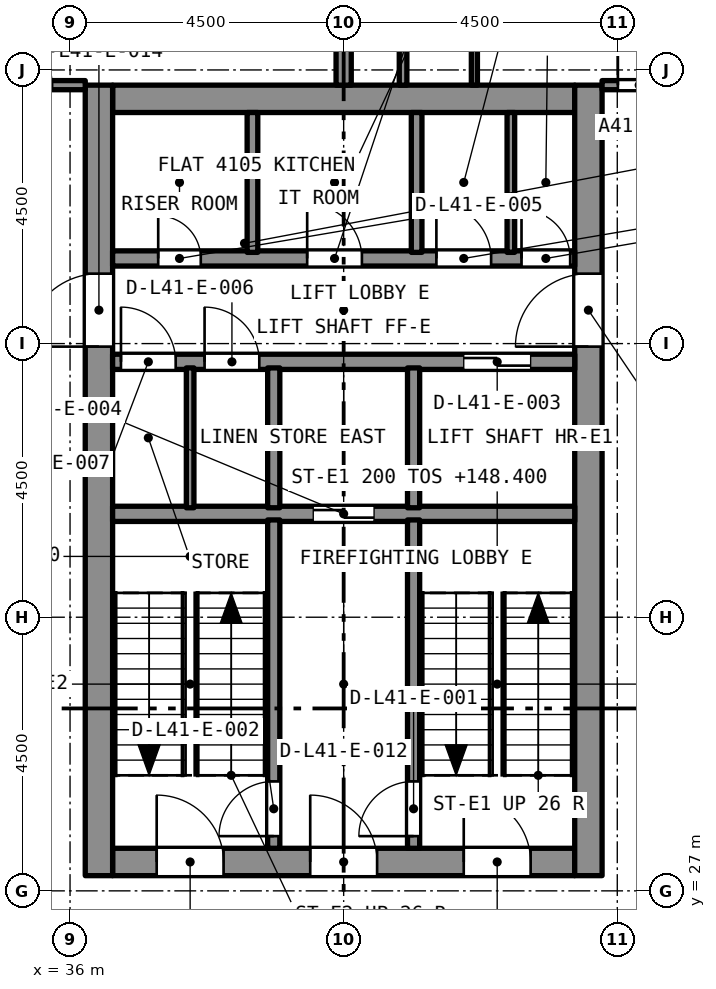
"""IFC4 building model, lengths in metres.
Left out: names, types, materials, properties, quantities, classifications, styles, units other than length and angle.
Written with IfcOpenShell. Run it as: python <this file> out.ifc"""

import sys

from ifc_helpers import new_model, si_unit, direction, frame, frame_2d, origin, place, context, subcontext, project, spatial, rectangle, extrude, element, fill, save


model = new_model("IFC4")
c1 = context("Model", 3, precision=1e-05, world=origin(), true_north=direction((0.0, 1.0)))
c2 = subcontext(c1, "Body", "Model", "MODEL_VIEW")
j1 = project(units=[si_unit("LENGTHUNIT", "METRE"), si_unit("PLANEANGLEUNIT", "RADIAN")], contexts=[c1])
p1 = place(None, origin())
s1 = spatial("IfcSite", under=j1, at=p1, CompositionType="ELEMENT")
p2 = place(p1, origin())
s2 = spatial("IfcBuilding", under=s1, at=p2, CompositionType="ELEMENT")
p3 = place(p2, frame((0.0, 0.0, 146.2)))
s3 = spatial("IfcBuildingStorey", under=s2, at=p3, CompositionType="ELEMENT", Elevation=146.2)
p4 = place(p3, frame((36.7, 27.475, 0.0), z_axis=(0.0, 0.0, 1.0), x_axis=(1.0, 0.0, 0.0)))
e1 = element("IfcWall", 1, at=p4, inside=s3, PredefinedType="SOLIDWALL", context=c2, shape_type="SweptSolid", body=[
    extrude(rectangle(XDim=7.6, YDim=0.45, at=frame_2d((3.8, 0.0))), origin(), (0.0, 0.0, 1.0), 4.4),
])
p5 = place(p4, frame((5.775, 0.0, 0.0)))
e2 = element("IfcOpeningElement", 2, at=p5, cuts=e1, PredefinedType="OPENING", context=c2, shape_type="SweptSolid", body=[
    extrude(rectangle(XDim=1.1, YDim=2.1, at=frame_2d((0.55, 1.05))), frame((0.0, 0.235, 0.0), z_axis=(0.0, -1.0, 0.0), x_axis=(1.0, 0.0, 0.0)), (0.0, 0.0, 1.0), 0.47),
])
p6 = place(p4, frame((3.25, 0.0, 0.0)))
e3 = element("IfcOpeningElement", 3, at=p6, cuts=e1, PredefinedType="OPENING", context=c2, shape_type="SweptSolid", body=[
    extrude(rectangle(XDim=1.1, YDim=2.1, at=frame_2d((0.55, 1.05))), frame((0.0, 0.235, 0.0), z_axis=(0.0, -1.0, 0.0), x_axis=(1.0, 0.0, 0.0)), (0.0, 0.0, 1.0), 0.47),
])
p7 = place(p4, frame((0.725, 0.0, 0.0)))
e4 = element("IfcOpeningElement", 4, at=p7, cuts=e1, PredefinedType="OPENING", context=c2, shape_type="SweptSolid", body=[
    extrude(rectangle(XDim=1.1, YDim=2.1, at=frame_2d((0.55, 1.05))), frame((0.0, 0.235, 0.0), z_axis=(0.0, -1.0, 0.0), x_axis=(1.0, 0.0, 0.0)), (0.0, 0.0, 1.0), 0.47),
])
p8 = place(p3, frame((36.7, 40.025, 0.0), z_axis=(0.0, 0.0, 1.0), x_axis=(1.0, 0.0, 0.0)))
e5 = element("IfcWall", 5, at=p8, inside=s3, PredefinedType="SOLIDWALL", context=c2, shape_type="SweptSolid", body=[
    extrude(rectangle(XDim=7.6, YDim=0.45, at=frame_2d((3.8, 0.0))), origin(), (0.0, 0.0, 1.0), 4.4),
])
p9 = place(p3, frame((36.475, 27.25, 0.0), z_axis=(0.0, 0.0, 1.0), x_axis=(0.0, 1.0, 0.0)))
e6 = element("IfcWall", 6, at=p9, inside=s3, PredefinedType="SOLIDWALL", context=c2, shape_type="SweptSolid", body=[
    extrude(rectangle(XDim=13.0, YDim=0.45, at=frame_2d((6.5, 0.0))), origin(), (0.0, 0.0, 1.0), 4.4),
])
p10 = place(p9, frame((8.7, 0.0, 0.0)))
e7 = element("IfcOpeningElement", 7, at=p10, cuts=e6, PredefinedType="OPENING", context=c2, shape_type="SweptSolid", body=[
    extrude(rectangle(XDim=1.2, YDim=2.1, at=frame_2d((0.6, 1.05))), frame((0.0, 0.235, 0.0), z_axis=(0.0, -1.0, 0.0), x_axis=(1.0, 0.0, 0.0)), (0.0, 0.0, 1.0), 0.47),
])
p11 = place(p3, frame((44.525, 27.25, 0.0), z_axis=(0.0, 0.0, 1.0), x_axis=(0.0, 1.0, 0.0)))
e8 = element("IfcWall", 8, at=p11, inside=s3, PredefinedType="SOLIDWALL", context=c2, shape_type="SweptSolid", body=[
    extrude(rectangle(XDim=13.0, YDim=0.45, at=frame_2d((6.5, 0.0))), origin(), (0.0, 0.0, 1.0), 4.4),
])
p12 = place(p11, frame((8.7, 0.0, 0.0)))
e9 = element("IfcOpeningElement", 9, at=p12, cuts=e8, PredefinedType="OPENING", context=c2, shape_type="SweptSolid", body=[
    extrude(rectangle(XDim=1.2, YDim=2.1, at=frame_2d((0.6, 1.05))), frame((0.0, 0.235, 0.0), z_axis=(0.0, -1.0, 0.0), x_axis=(1.0, 0.0, 0.0)), (0.0, 0.0, 1.0), 0.47),
])
p13 = place(p3, frame((41.477, 40.25, 0.0), z_axis=(0.0, 0.0, 1.0), x_axis=(0.0, 1.0, 0.0)))
e10 = element("IfcWall", 10, at=p13, inside=s3, PredefinedType="PARTITIONING", context=c2, shape_type="SweptSolid", body=[
    extrude(rectangle(XDim=3.347, YDim=0.125, at=frame_2d((1.674, 0.0))), origin(), (0.0, 0.0, 1.0), 4.1),
])
p14 = place(p3, frame((40.5, 40.25, 0.0), z_axis=(0.0, 0.0, 1.0), x_axis=(0.0, 1.0, 0.0)))
e11 = element("IfcWall", 11, at=p14, inside=s3, PredefinedType="PARTITIONING", context=c2, shape_type="SweptSolid", body=[
    extrude(rectangle(XDim=8.775, YDim=0.25, at=frame_2d((4.387, 0.0))), origin(), (0.0, 0.0, 1.0), 4.1),
])
p15 = place(p3, frame((42.65, 40.25, 0.0), z_axis=(0.0, 0.0, 1.0), x_axis=(0.0, 1.0, 0.0)))
e12 = element("IfcWall", 12, at=p15, inside=s3, PredefinedType="PARTITIONING", context=c2, shape_type="SweptSolid", body=[
    extrude(rectangle(XDim=3.36, YDim=0.1, at=frame_2d((1.68, 0.0))), origin(), (0.0, 0.0, 1.0), 4.1),
])
p16 = place(p3, frame((44.75, 40.25, 0.0), z_axis=(0.0, 0.0, 1.0), x_axis=(1.0, 0.0, 0.0)))
e13 = element("IfcWall", 13, at=p16, inside=s3, PredefinedType="PARTITIONING", context=c2, shape_type="SweptSolid", body=[
    extrude(rectangle(XDim=1.2, YDim=0.15, at=frame_2d((0.6, 0.0))), origin(), (0.0, 0.0, 1.0), 4.1),
])
p17 = place(p16, frame((0.26, 0.0, 0.0)))
e14 = element("IfcOpeningElement", 14, at=p17, cuts=e13, PredefinedType="OPENING", context=c2, shape_type="SweptSolid", body=[
    extrude(rectangle(XDim=0.7, YDim=2.1, at=frame_2d((0.35, 1.05))), frame((0.0, 0.085, 0.0), z_axis=(0.0, -1.0, 0.0), x_axis=(1.0, 0.0, 0.0)), (0.0, 0.0, 1.0), 0.17),
])
p18 = place(p3, frame((34.575, 40.25, 0.0), z_axis=(0.0, 0.0, 1.0), x_axis=(1.0, 0.0, 0.0)))
e15 = element("IfcWall", 15, at=p18, inside=s3, PredefinedType="PARTITIONING", context=c2, shape_type="SweptSolid", body=[
    extrude(rectangle(XDim=1.675, YDim=0.15, at=frame_2d((0.837, 0.0))), origin(), (0.0, 0.0, 1.0), 4.1),
])
p19 = place(p18, frame((0.13, 0.0, 0.0)))
e16 = element("IfcOpeningElement", 16, at=p19, cuts=e15, PredefinedType="OPENING", context=c2, shape_type="SweptSolid", body=[
    extrude(rectangle(XDim=1.0, YDim=2.1, at=frame_2d((0.5, 1.05))), frame((0.0, 0.085, 0.0), z_axis=(0.0, -1.0, 0.0), x_axis=(1.0, 0.0, 0.0)), (0.0, 0.0, 1.0), 0.17),
])
p20 = place(p3, frame((36.7, 33.2, 0.0), z_axis=(0.0, 0.0, 1.0), x_axis=(1.0, 0.0, 0.0)))
e17 = element("IfcWall", 17, at=p20, inside=s3, PredefinedType="SOLIDWALL", context=c2, shape_type="SweptSolid", body=[
    extrude(rectangle(XDim=7.6, YDim=0.25, at=frame_2d((3.8, 0.0))), origin(), (0.0, 0.0, 1.0), 4.1),
])
p21 = place(p20, frame((3.3, 0.0, 0.0)))
e18 = element("IfcOpeningElement", 18, at=p21, cuts=e17, PredefinedType="OPENING", context=c2, shape_type="SweptSolid", body=[
    extrude(rectangle(XDim=1.0, YDim=2.1, at=frame_2d((0.5, 1.05))), frame((0.0, 0.135, 0.0), z_axis=(0.0, -1.0, 0.0), x_axis=(1.0, 0.0, 0.0)), (0.0, 0.0, 1.0), 0.27),
])
p22 = place(p3, frame((36.7, 35.7, 0.0), z_axis=(0.0, 0.0, 1.0), x_axis=(1.0, 0.0, 0.0)))
e19 = element("IfcWall", 19, at=p22, inside=s3, PredefinedType="SOLIDWALL", context=c2, shape_type="SweptSolid", body=[
    extrude(rectangle(XDim=7.6, YDim=0.25, at=frame_2d((3.8, 0.0))), origin(), (0.0, 0.0, 1.0), 4.1),
])
p23 = place(p22, frame((5.775, 0.0, 0.0)))
e20 = element("IfcOpeningElement", 20, at=p23, cuts=e19, PredefinedType="OPENING", context=c2, shape_type="SweptSolid", body=[
    extrude(rectangle(XDim=1.1, YDim=2.4, at=frame_2d((0.55, 1.2))), frame((0.0, 0.135, 0.0), z_axis=(0.0, -1.0, 0.0), x_axis=(1.0, 0.0, 0.0)), (0.0, 0.0, 1.0), 0.27),
])
p24 = place(p22, frame((1.512, 0.0, 0.0)))
e21 = element("IfcOpeningElement", 21, at=p24, cuts=e19, PredefinedType="OPENING", context=c2, shape_type="SweptSolid", body=[
    extrude(rectangle(XDim=0.9, YDim=2.1, at=frame_2d((0.45, 1.05))), frame((0.0, 0.135, 0.0), z_axis=(0.0, -1.0, 0.0), x_axis=(1.0, 0.0, 0.0)), (0.0, 0.0, 1.0), 0.27),
])
p25 = place(p22, frame((0.137, 0.0, 0.0)))
e22 = element("IfcOpeningElement", 22, at=p25, cuts=e19, PredefinedType="OPENING", context=c2, shape_type="SweptSolid", body=[
    extrude(rectangle(XDim=0.9, YDim=2.1, at=frame_2d((0.45, 1.05))), frame((0.0, 0.135, 0.0), z_axis=(0.0, -1.0, 0.0), x_axis=(1.0, 0.0, 0.0)), (0.0, 0.0, 1.0), 0.27),
])
p26 = place(p3, frame((36.7, 37.4, 0.0), z_axis=(0.0, 0.0, 1.0), x_axis=(1.0, 0.0, 0.0)))
e23 = element("IfcWall", 23, at=p26, inside=s3, PredefinedType="SOLIDWALL", context=c2, shape_type="SweptSolid", body=[
    extrude(rectangle(XDim=7.6, YDim=0.25, at=frame_2d((3.8, 0.0))), origin(), (0.0, 0.0, 1.0), 4.1),
])
p27 = place(p26, frame((0.75, 0.0, 0.0)))
e24 = element("IfcOpeningElement", 24, at=p27, cuts=e23, PredefinedType="OPENING", context=c2, shape_type="SweptSolid", body=[
    extrude(rectangle(XDim=0.7, YDim=2.1, at=frame_2d((0.35, 1.05))), frame((0.0, 0.135, 0.0), z_axis=(0.0, -1.0, 0.0), x_axis=(1.0, 0.0, 0.0)), (0.0, 0.0, 1.0), 0.27),
])
p28 = place(p26, frame((6.725, 0.0, 0.0)))
e25 = element("IfcOpeningElement", 25, at=p28, cuts=e23, PredefinedType="OPENING", context=c2, shape_type="SweptSolid", body=[
    extrude(rectangle(XDim=0.8, YDim=2.1, at=frame_2d((0.4, 1.05))), frame((0.0, 0.135, 0.0), z_axis=(0.0, -1.0, 0.0), x_axis=(1.0, 0.0, 0.0)), (0.0, 0.0, 1.0), 0.27),
])
p29 = place(p26, frame((5.325, 0.0, 0.0)))
e26 = element("IfcOpeningElement", 26, at=p29, cuts=e23, PredefinedType="OPENING", context=c2, shape_type="SweptSolid", body=[
    extrude(rectangle(XDim=0.9, YDim=2.1, at=frame_2d((0.45, 1.05))), frame((0.0, 0.135, 0.0), z_axis=(0.0, -1.0, 0.0), x_axis=(1.0, 0.0, 0.0)), (0.0, 0.0, 1.0), 0.27),
])
p30 = place(p26, frame((3.2, 0.0, 0.0)))
e27 = element("IfcOpeningElement", 27, at=p30, cuts=e23, PredefinedType="OPENING", context=c2, shape_type="SweptSolid", body=[
    extrude(rectangle(XDim=0.9, YDim=2.1, at=frame_2d((0.45, 1.05))), frame((0.0, 0.135, 0.0), z_axis=(0.0, -1.0, 0.0), x_axis=(1.0, 0.0, 0.0)), (0.0, 0.0, 1.0), 0.27),
])
p31 = place(p3, frame((41.65, 27.7, 0.0), z_axis=(0.0, 0.0, 1.0), x_axis=(0.0, 1.0, 0.0)))
e28 = element("IfcWall", 28, at=p31, inside=s3, PredefinedType="SOLIDWALL", context=c2, shape_type="SweptSolid", body=[
    extrude(rectangle(XDim=5.4, YDim=0.2, at=frame_2d((2.7, 0.0))), origin(), (0.0, 0.0, 1.0), 4.1),
])
p32 = place(p31, frame((0.2, 0.0, 0.0)))
e29 = element("IfcOpeningElement", 29, at=p32, cuts=e28, PredefinedType="OPENING", context=c2, shape_type="SweptSolid", body=[
    extrude(rectangle(XDim=0.9, YDim=2.1, at=frame_2d((0.45, 1.05))), frame((0.0, 0.11, 0.0), z_axis=(0.0, -1.0, 0.0), x_axis=(1.0, 0.0, 0.0)), (0.0, 0.0, 1.0), 0.22),
])
p33 = place(p3, frame((39.35, 27.7, 0.0), z_axis=(0.0, 0.0, 1.0), x_axis=(0.0, 1.0, 0.0)))
e30 = element("IfcWall", 30, at=p33, inside=s3, PredefinedType="SOLIDWALL", context=c2, shape_type="SweptSolid", body=[
    extrude(rectangle(XDim=5.4, YDim=0.2, at=frame_2d((2.7, 0.0))), origin(), (0.0, 0.0, 1.0), 4.1),
])
p34 = place(p33, frame((0.2, 0.0, 0.0)))
e31 = element("IfcOpeningElement", 31, at=p34, cuts=e30, PredefinedType="OPENING", context=c2, shape_type="SweptSolid", body=[
    extrude(rectangle(XDim=0.9, YDim=2.1, at=frame_2d((0.45, 1.05))), frame((0.0, 0.11, 0.0), z_axis=(0.0, -1.0, 0.0), x_axis=(1.0, 0.0, 0.0)), (0.0, 0.0, 1.0), 0.22),
])
for number, where, z_axis, x_axis in (
    (32, (41.65, 33.3, 0.0), (0.0, 0.0, 1.0), (0.0, 1.0, 0.0)),
    (33, (39.35, 33.3, 0.0), (0.0, 0.0, 1.0), (0.0, 1.0, 0.0)),
):
    element("IfcWall", number, at=place(p3, frame(where, z_axis=z_axis, x_axis=x_axis)), inside=s3, PredefinedType="SOLIDWALL", context=c2, shape_type="SweptSolid", body=[
        extrude(rectangle(XDim=2.3, YDim=0.2, at=frame_2d((1.15, 0.0))), origin(), (0.0, 0.0, 1.0), 4.1),
    ])
for number, where, z_axis, x_axis in (
    (34, (41.7, 37.5, 0.0), (0.0, 0.0, 1.0), (0.0, 1.0, 0.0)),
    (35, (39.0, 37.5, 0.0), (0.0, 0.0, 1.0), (0.0, 1.0, 0.0)),
):
    element("IfcWall", number, at=place(p3, frame(where, z_axis=z_axis, x_axis=x_axis)), inside=s3, PredefinedType="SOLIDWALL", context=c2, shape_type="SweptSolid", body=[
        extrude(rectangle(XDim=2.3, YDim=0.175, at=frame_2d((1.15, 0.0))), origin(), (0.0, 0.0, 1.0), 4.1),
    ])
for number, where, z_axis, x_axis in (
    (36, (37.975, 33.3, 0.0), (0.0, 0.0, 1.0), (0.0, 1.0, 0.0)),
    (37, (43.25, 37.5, 0.0), (0.0, 0.0, 1.0), (0.0, 1.0, 0.0)),
):
    element("IfcWall", number, at=place(p3, frame(where, z_axis=z_axis, x_axis=x_axis)), inside=s3, PredefinedType="PARTITIONING", context=c2, shape_type="SweptSolid", body=[
        extrude(rectangle(XDim=2.3, YDim=0.125, at=frame_2d((1.15, 0.0))), origin(), (0.0, 0.0, 1.0), 4.1),
    ])
p35 = place(p17, origin())
e38 = element("IfcDoor", 38, at=p35, inside=s3, OperationType="SINGLE_SWING_RIGHT", PredefinedType="DOOR", context=c2, shape_type="SweptSolid", body=[
    extrude(rectangle(XDim=0.7, YDim=2.1, at=frame_2d((0.35, 1.05))), frame((0.0, 0.025, 0.0), z_axis=(0.0, -1.0, 0.0), x_axis=(1.0, 0.0, 0.0)), (0.0, 0.0, 1.0), 0.05),
])
fill(e14, e38)
p36 = place(p19, origin())
e39 = element("IfcDoor", 39, at=p36, inside=s3, OperationType="SINGLE_SWING_LEFT", PredefinedType="DOOR", context=c2, shape_type="SweptSolid", body=[
    extrude(rectangle(XDim=1.0, YDim=2.1, at=frame_2d((0.5, 1.05))), frame((0.0, 0.025, 0.0), z_axis=(0.0, -1.0, 0.0), x_axis=(1.0, 0.0, 0.0)), (0.0, 0.0, 1.0), 0.05),
])
fill(e16, e39)
p37 = place(p32, origin())
e40 = element("IfcDoor", 40, at=p37, inside=s3, OperationType="SINGLE_SWING_LEFT", PredefinedType="DOOR", context=c2, shape_type="SweptSolid", body=[
    extrude(rectangle(XDim=0.9, YDim=2.1, at=frame_2d((0.45, 1.05))), frame((0.0, 0.025, 0.0), z_axis=(0.0, -1.0, 0.0), x_axis=(1.0, 0.0, 0.0)), (0.0, 0.0, 1.0), 0.05),
])
fill(e29, e40)
p38 = place(p34, origin())
e41 = element("IfcDoor", 41, at=p38, inside=s3, OperationType="SINGLE_SWING_LEFT", PredefinedType="DOOR", context=c2, shape_type="SweptSolid", body=[
    extrude(rectangle(XDim=0.9, YDim=2.1, at=frame_2d((0.45, 1.05))), frame((0.0, 0.025, 0.0), z_axis=(0.0, -1.0, 0.0), x_axis=(1.0, 0.0, 0.0)), (0.0, 0.0, 1.0), 0.05),
])
fill(e31, e41)
p39 = place(p23, origin())
e42 = element("IfcDoor", 42, at=p39, inside=s3, OperationType="SLIDING_TO_LEFT", PredefinedType="DOOR", context=c2, shape_type="SweptSolid", body=[
    extrude(rectangle(XDim=1.1, YDim=2.4, at=frame_2d((0.55, 1.2))), frame((0.0, 0.025, 0.0), z_axis=(0.0, -1.0, 0.0), x_axis=(1.0, 0.0, 0.0)), (0.0, 0.0, 1.0), 0.05),
])
fill(e20, e42)
p40 = place(p21, origin())
e43 = element("IfcDoor", 43, at=p40, inside=s3, OperationType="SLIDING_TO_LEFT", PredefinedType="DOOR", context=c2, shape_type="SweptSolid", body=[
    extrude(rectangle(XDim=1.0, YDim=2.1, at=frame_2d((0.5, 1.05))), frame((0.0, 0.025, 0.0), z_axis=(0.0, -1.0, 0.0), x_axis=(1.0, 0.0, 0.0)), (0.0, 0.0, 1.0), 0.05),
])
fill(e18, e43)
p41 = place(p27, origin())
e44 = element("IfcDoor", 44, at=p41, inside=s3, OperationType="SINGLE_SWING_LEFT", PredefinedType="DOOR", context=c2, shape_type="SweptSolid", body=[
    extrude(rectangle(XDim=0.7, YDim=2.1, at=frame_2d((0.35, 1.05))), frame((0.0, 0.025, 0.0), z_axis=(0.0, -1.0, 0.0), x_axis=(1.0, 0.0, 0.0)), (0.0, 0.0, 1.0), 0.05),
])
fill(e24, e44)
p42 = place(p24, origin())
e45 = element("IfcDoor", 45, at=p42, inside=s3, OperationType="SINGLE_SWING_LEFT", PredefinedType="DOOR", context=c2, shape_type="SweptSolid", body=[
    extrude(rectangle(XDim=0.9, YDim=2.1, at=frame_2d((0.45, 1.05))), frame((0.0, 0.025, 0.0), z_axis=(0.0, -1.0, 0.0), x_axis=(1.0, 0.0, 0.0)), (0.0, 0.0, 1.0), 0.05),
])
fill(e21, e45)
p43 = place(p25, origin())
e46 = element("IfcDoor", 46, at=p43, inside=s3, OperationType="SINGLE_SWING_LEFT", PredefinedType="DOOR", context=c2, shape_type="SweptSolid", body=[
    extrude(rectangle(XDim=0.9, YDim=2.1, at=frame_2d((0.45, 1.05))), frame((0.0, 0.025, 0.0), z_axis=(0.0, -1.0, 0.0), x_axis=(1.0, 0.0, 0.0)), (0.0, 0.0, 1.0), 0.05),
])
fill(e22, e46)
p44 = place(p28, origin())
e47 = element("IfcDoor", 47, at=p44, inside=s3, OperationType="SINGLE_SWING_LEFT", PredefinedType="DOOR", context=c2, shape_type="SweptSolid", body=[
    extrude(rectangle(XDim=0.8, YDim=2.1, at=frame_2d((0.4, 1.05))), frame((0.0, 0.025, 0.0), z_axis=(0.0, -1.0, 0.0), x_axis=(1.0, 0.0, 0.0)), (0.0, 0.0, 1.0), 0.05),
])
fill(e25, e47)
p45 = place(p29, origin())
e48 = element("IfcDoor", 48, at=p45, inside=s3, OperationType="SINGLE_SWING_LEFT", PredefinedType="DOOR", context=c2, shape_type="SweptSolid", body=[
    extrude(rectangle(XDim=0.9, YDim=2.1, at=frame_2d((0.45, 1.05))), frame((0.0, 0.025, 0.0), z_axis=(0.0, -1.0, 0.0), x_axis=(1.0, 0.0, 0.0)), (0.0, 0.0, 1.0), 0.05),
])
fill(e26, e48)
p46 = place(p30, origin())
e49 = element("IfcDoor", 49, at=p46, inside=s3, OperationType="SINGLE_SWING_LEFT", PredefinedType="DOOR", context=c2, shape_type="SweptSolid", body=[
    extrude(rectangle(XDim=0.9, YDim=2.1, at=frame_2d((0.45, 1.05))), frame((0.0, 0.025, 0.0), z_axis=(0.0, -1.0, 0.0), x_axis=(1.0, 0.0, 0.0)), (0.0, 0.0, 1.0), 0.05),
])
fill(e27, e49)
p47 = place(p5, origin())
e50 = element("IfcDoor", 50, at=p47, inside=s3, OperationType="SINGLE_SWING_LEFT", PredefinedType="DOOR", context=c2, shape_type="SweptSolid", body=[
    extrude(rectangle(XDim=1.1, YDim=2.1, at=frame_2d((0.55, 1.05))), frame((0.0, 0.025, 0.0), z_axis=(0.0, -1.0, 0.0), x_axis=(1.0, 0.0, 0.0)), (0.0, 0.0, 1.0), 0.05),
])
fill(e2, e50)
p48 = place(p6, origin())
e51 = element("IfcDoor", 51, at=p48, inside=s3, OperationType="SINGLE_SWING_LEFT", PredefinedType="DOOR", context=c2, shape_type="SweptSolid", body=[
    extrude(rectangle(XDim=1.1, YDim=2.1, at=frame_2d((0.55, 1.05))), frame((0.0, 0.025, 0.0), z_axis=(0.0, -1.0, 0.0), x_axis=(1.0, 0.0, 0.0)), (0.0, 0.0, 1.0), 0.05),
])
fill(e3, e51)
p49 = place(p7, origin())
e52 = element("IfcDoor", 52, at=p49, inside=s3, OperationType="SINGLE_SWING_LEFT", PredefinedType="DOOR", context=c2, shape_type="SweptSolid", body=[
    extrude(rectangle(XDim=1.1, YDim=2.1, at=frame_2d((0.55, 1.05))), frame((0.0, 0.025, 0.0), z_axis=(0.0, -1.0, 0.0), x_axis=(1.0, 0.0, 0.0)), (0.0, 0.0, 1.0), 0.05),
])
fill(e4, e52)
p50 = place(p10, origin())
e53 = element("IfcDoor", 53, at=p50, inside=s3, OperationType="SINGLE_SWING_LEFT", PredefinedType="DOOR", context=c2, shape_type="SweptSolid", body=[
    extrude(rectangle(XDim=1.2, YDim=2.1, at=frame_2d((0.6, 1.05))), frame((0.0, 0.025, 0.0), z_axis=(0.0, -1.0, 0.0), x_axis=(1.0, 0.0, 0.0)), (0.0, 0.0, 1.0), 0.05),
])
fill(e7, e53)
p51 = place(p12, origin())
e54 = element("IfcDoor", 54, at=p51, inside=s3, OperationType="SINGLE_SWING_LEFT", PredefinedType="DOOR", context=c2, shape_type="SweptSolid", body=[
    extrude(rectangle(XDim=1.2, YDim=2.1, at=frame_2d((0.6, 1.05))), frame((0.0, 0.025, 0.0), z_axis=(0.0, -1.0, 0.0), x_axis=(1.0, 0.0, 0.0)), (0.0, 0.0, 1.0), 0.05),
])
fill(e9, e54)
save(model, sys.argv[1])
